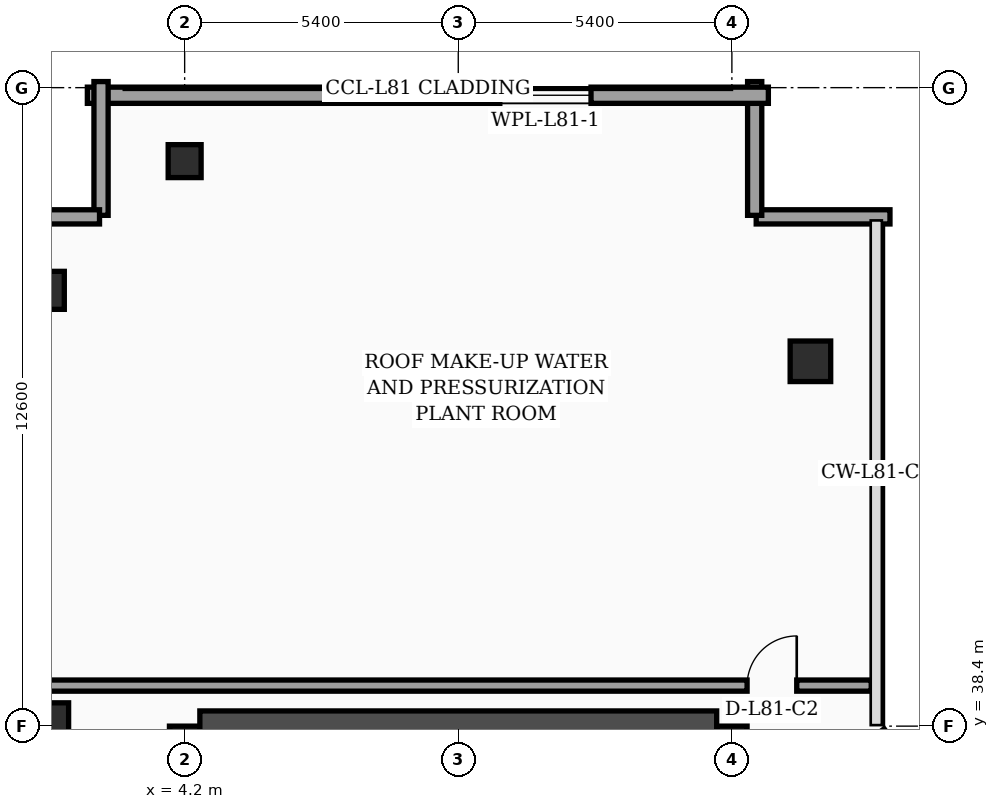
"""IFC4 building model, lengths in metres.
Left out: names, types, materials, properties, quantities, classifications, styles, units other than length and angle.
Written with IfcOpenShell. Run it as: python <this file> out.ifc"""

import sys

from ifc_helpers import new_model, si_unit, direction, frame, frame_2d, origin, origin_2d, place, context, subcontext, project, spatial, rectangle, hollow_rectangle, extrude, element, fill, save


model = new_model("IFC4")
c1 = context("Model", 3, precision=1e-05, world=origin(), true_north=direction((0.0, 1.0)))
c2 = subcontext(c1, "Body", "Model", "MODEL_VIEW")
j1 = project(units=[si_unit("LENGTHUNIT", "METRE"), si_unit("PLANEANGLEUNIT", "RADIAN")], contexts=[c1])
p1 = place(None, origin())
s1 = spatial("IfcSite", under=j1, at=p1, CompositionType="ELEMENT")
p2 = place(p1, origin())
s2 = spatial("IfcBuilding", under=s1, at=p2, CompositionType="ELEMENT")
p3 = place(p2, frame((0.0, 0.0, 330.5)))
s3 = spatial("IfcBuildingStorey", under=s2, at=p3, CompositionType="ELEMENT", Elevation=330.5)
p4 = place(p3, frame((4.2, 16.8, 0.0), z_axis=(0.0, 0.0, 1.0), x_axis=(0.0, 1.0, 0.0)))
e1 = element("IfcWall", 1, at=p4, inside=s3, PredefinedType="SHEAR", context=c2, shape_type="SweptSolid", body=[
    extrude(rectangle(XDim=21.6, YDim=0.6, at=frame_2d((10.8, 0.0))), origin(), (0.0, 0.0, 1.0), 4.76),
])
p5 = place(p3, frame((15.0, 16.8, 0.0), z_axis=(0.0, 0.0, 1.0), x_axis=(0.0, 1.0, 0.0)))
e2 = element("IfcWall", 2, at=p5, inside=s3, PredefinedType="SHEAR", context=c2, shape_type="SweptSolid", body=[
    extrude(rectangle(XDim=21.6, YDim=0.6, at=frame_2d((10.8, 0.0))), origin(), (0.0, 0.0, 1.0), 4.76),
])
p6 = place(p5, frame((8.65, 0.0, 0.0)))
e3 = element("IfcOpeningElement", 3, at=p6, cuts=e2, PredefinedType="OPENING", context=c2, shape_type="SweptSolid", body=[
    extrude(rectangle(XDim=1.1, YDim=2.2, at=frame_2d((0.55, 1.1))), frame((0.0, 0.31, 0.0), z_axis=(0.0, -1.0, 0.0), x_axis=(1.0, 0.0, 0.0)), (0.0, 0.0, 1.0), 0.62),
])
p7 = place(p3, frame((4.5, 38.4, 0.0), z_axis=(0.0, 0.0, 1.0), x_axis=(1.0, 0.0, 0.0)))
e4 = element("IfcWall", 4, at=p7, inside=s3, PredefinedType="SHEAR", context=c2, shape_type="SweptSolid", body=[
    extrude(rectangle(XDim=10.2, YDim=0.6, at=frame_2d((5.1, 0.0))), origin(), (0.0, 0.0, 1.0), 4.76),
])
p8 = place(p3, frame((1.45, 38.4, 0.0), z_axis=(0.0, 0.0, 1.0), x_axis=(1.0, 0.0, 0.0)))
e5 = element("IfcColumn", 5, at=p8, inside=s3, PredefinedType="COLUMN", context=c2, shape_type="SweptSolid", body=[
    extrude(rectangle(XDim=0.92, YDim=0.92, at=origin_2d()), origin(), (0.0, 0.0, 1.0), 4.76),
])
p9 = place(p3, frame((1.45, 47.0, 0.0), z_axis=(0.0, 0.0, 1.0), x_axis=(1.0, 0.0, 0.0)))
e6 = element("IfcColumn", 6, at=p9, inside=s3, PredefinedType="COLUMN", context=c2, shape_type="SweptSolid", body=[
    extrude(hollow_rectangle(XDim=0.75, YDim=0.75, WallThickness=0.032, at=origin_2d()), origin(), (0.0, 0.0, 1.0), 4.76),
])
p10 = place(p3, frame((4.2, 49.55, 0.0), z_axis=(0.0, 0.0, 1.0), x_axis=(1.0, 0.0, 0.0)))
e7 = element("IfcColumn", 7, at=p10, inside=s3, PredefinedType="COLUMN", context=c2, shape_type="SweptSolid", body=[
    extrude(hollow_rectangle(XDim=0.65, YDim=0.65, WallThickness=0.028, at=origin_2d()), origin(), (0.0, 0.0, 1.0), 4.76),
])
p11 = place(p3, frame((16.55, 45.6, 0.0), z_axis=(0.0, 0.0, 1.0), x_axis=(1.0, 0.0, 0.0)))
e8 = element("IfcColumn", 8, at=p11, inside=s3, PredefinedType="COLUMN", context=c2, shape_type="SweptSolid", body=[
    extrude(rectangle(XDim=0.8, YDim=0.8, at=origin_2d()), origin(), (0.0, 0.0, 1.0), 4.76),
])
for number, where, z_axis, x_axis in (
    (9, (18.12, 48.45, 0.0), (0.0, 0.0, 1.0), (-1.0, 0.0, 0.0)),
    (10, (15.45, 48.48, 0.0), (0.0, 0.0, 1.0), (0.0, 1.0, 0.0)),
):
    element("IfcWall", number, at=place(p3, frame(where, z_axis=z_axis, x_axis=x_axis)), inside=s3, PredefinedType="SOLIDWALL", context=c2, shape_type="SweptSolid", body=[
        extrude(rectangle(XDim=2.64, YDim=0.28, at=frame_2d((1.32, 0.0))), origin(), (0.0, 0.0, 1.0), 4.76),
    ])
p12 = place(p3, frame((15.72, 50.85, 0.0), z_axis=(0.0, 0.0, 1.0), x_axis=(-1.0, 0.0, 0.0)))
e11 = element("IfcWall", 11, at=p12, inside=s3, PredefinedType="SOLIDWALL", context=c2, shape_type="SweptSolid", body=[
    extrude(rectangle(XDim=13.44, YDim=0.32, at=frame_2d((6.72, 0.0))), origin(), (0.0, 0.0, 1.0), 4.76),
])
p13 = place(p12, frame((3.5, 0.0, 1.1)))
e12 = element("IfcOpeningElement", 12, at=p13, cuts=e11, PredefinedType="OPENING", context=c2, shape_type="SweptSolid", body=[
    extrude(rectangle(XDim=1.8, YDim=1.5, at=frame_2d((0.9, 0.75))), frame((0.0, 0.17, 0.0), z_axis=(0.0, -1.0, 0.0), x_axis=(1.0, 0.0, 0.0)), (0.0, 0.0, 1.0), 0.34),
])
for number, where, z_axis, x_axis in (
    (13, (2.55, 51.12, 0.0), (0.0, 0.0, 1.0), (0.0, -1.0, 0.0)),
    (14, (2.52, 48.45, 0.0), (0.0, 0.0, 1.0), (-1.0, 0.0, 0.0)),
):
    element("IfcWall", number, at=place(p3, frame(where, z_axis=z_axis, x_axis=x_axis)), inside=s3, PredefinedType="SOLIDWALL", context=c2, shape_type="SweptSolid", body=[
        extrude(rectangle(XDim=2.64, YDim=0.28, at=frame_2d((1.32, 0.0))), origin(), (0.0, 0.0, 1.0), 4.76),
    ])
p14 = place(p3, frame((0.08, 39.2, 0.0), z_axis=(0.0, 0.0, 1.0), x_axis=(1.0, 0.0, 0.0)))
e15 = element("IfcWall", 15, at=p14, inside=s3, PredefinedType="SOLIDWALL", context=c2, shape_type="SweptSolid", body=[
    extrude(rectangle(XDim=17.67, YDim=0.22, at=frame_2d((8.835, 0.0))), origin(), (0.0, 0.0, 1.0), 4.19),
])
p15 = place(p14, frame((15.22, 0.0, 0.0)))
e16 = element("IfcOpeningElement", 16, at=p15, cuts=e15, PredefinedType="OPENING", context=c2, shape_type="SweptSolid", body=[
    extrude(rectangle(XDim=0.98, YDim=2.15, at=frame_2d((0.49, 1.075))), frame((0.0, 0.12, 0.0), z_axis=(0.0, -1.0, 0.0), x_axis=(1.0, 0.0, 0.0)), (0.0, 0.0, 1.0), 0.24),
])
p16 = place(p13, origin())
e17 = element("IfcWindow", 17, at=p16, inside=s3, PartitioningType="SINGLE_PANEL", PredefinedType="WINDOW", context=c2, shape_type="SweptSolid", body=[
    extrude(rectangle(XDim=1.8, YDim=1.5, at=frame_2d((0.9, 0.75))), frame((0.0, 0.03, 0.0), z_axis=(0.0, -1.0, 0.0), x_axis=(1.0, 0.0, 0.0)), (0.0, 0.0, 1.0), 0.06),
])
fill(e12, e17)
p17 = place(p15, origin())
e18 = element("IfcDoor", 18, at=p17, inside=s3, OperationType="SINGLE_SWING_RIGHT", PredefinedType="DOOR", context=c2, shape_type="SweptSolid", body=[
    extrude(rectangle(XDim=0.98, YDim=2.15, at=frame_2d((0.49, 1.075))), frame((0.0, 0.025, 0.0), z_axis=(0.0, -1.0, 0.0), x_axis=(1.0, 0.0, 0.0)), (0.0, 0.0, 1.0), 0.05),
])
fill(e16, e18)
save(model, sys.argv[1])
